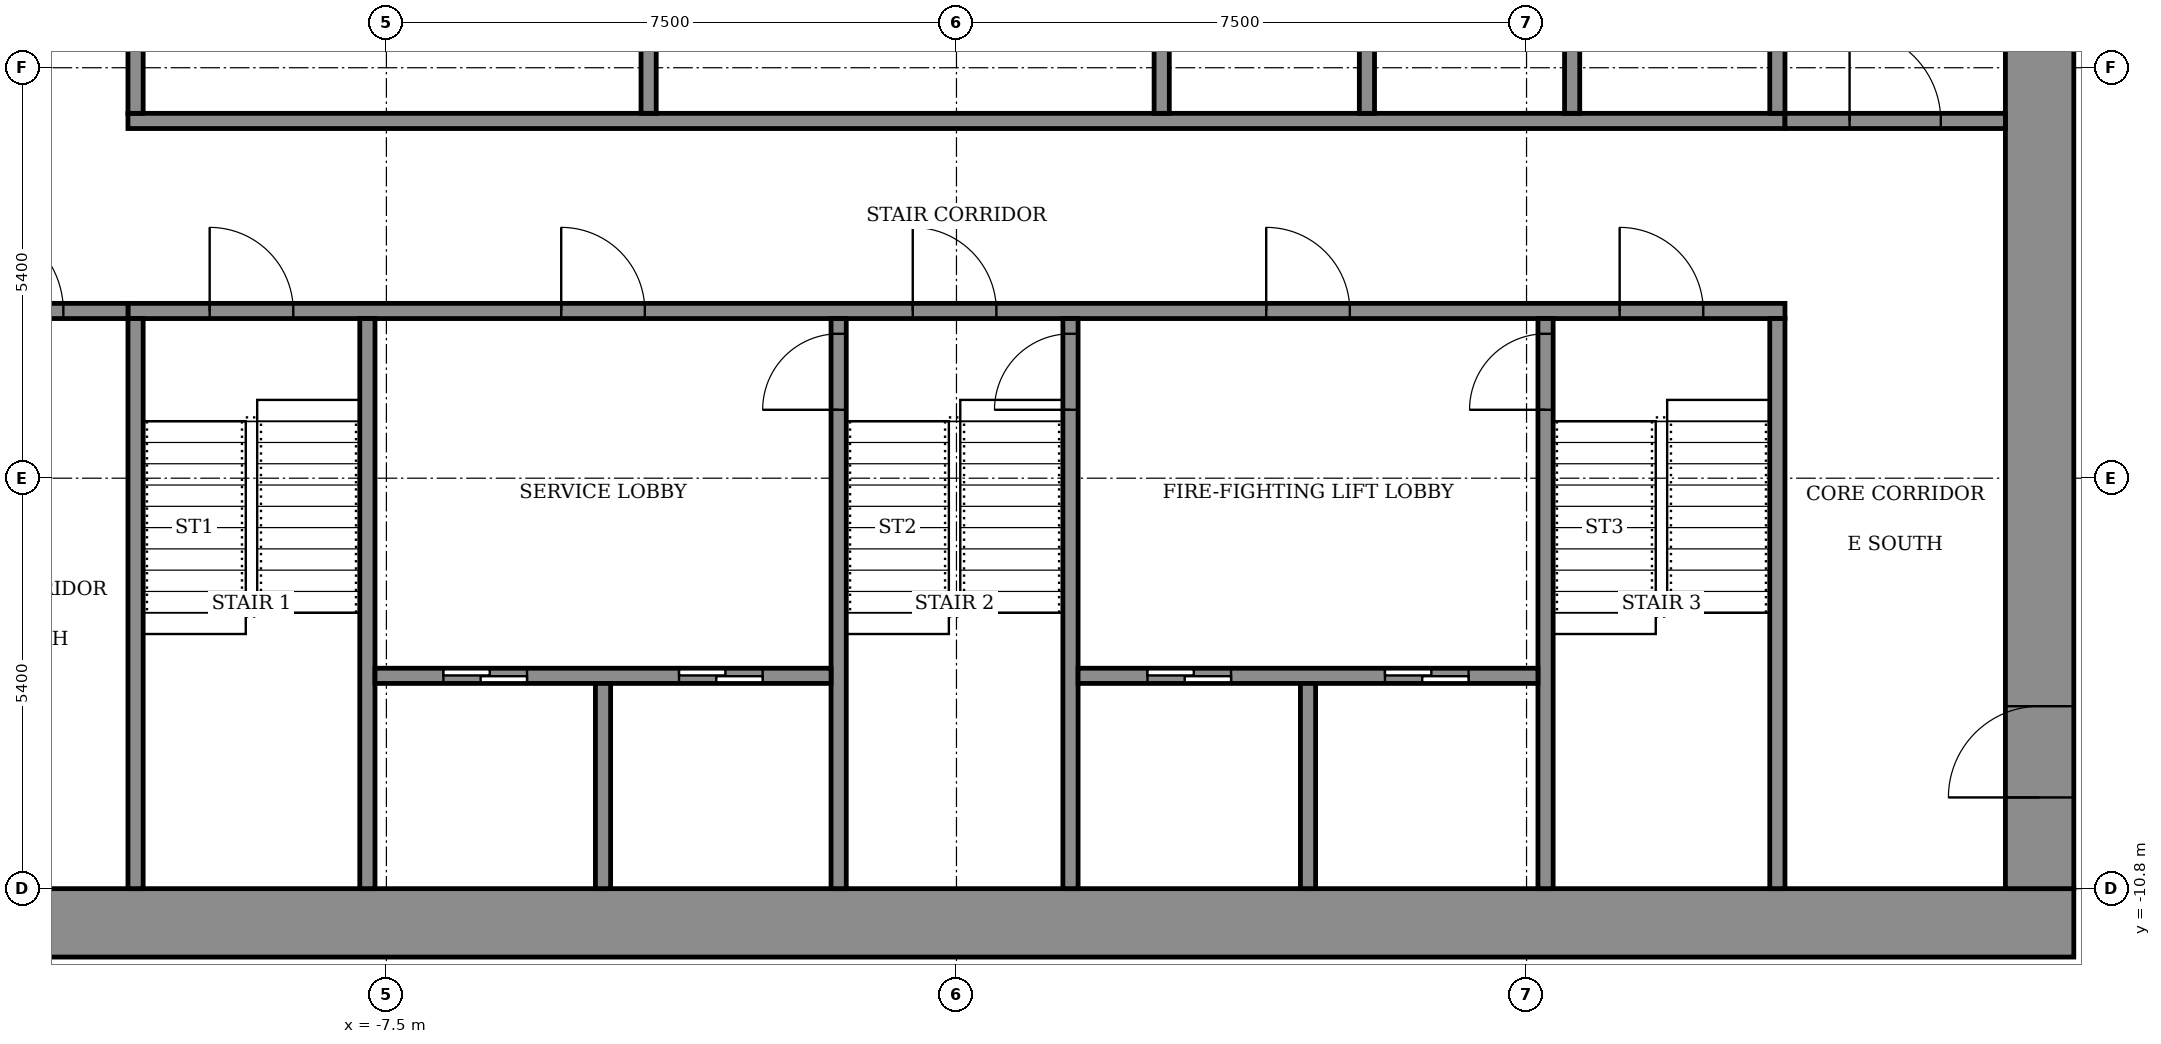
"""IFC4 building model, lengths in metres.
Left out: names, types, materials, properties, quantities, classifications, styles, units other than length and angle.
Written with IfcOpenShell. Run it as: python <this file> out.ifc"""

import sys

from ifc_helpers import new_model, si_unit, direction, frame, frame_2d, origin, place, context, subcontext, project, spatial, rectangle, extrude, element, fill, save


model = new_model("IFC4")
c1 = context("Model", 3, precision=1e-05, world=origin(), true_north=direction((0.0, 1.0)))
c2 = subcontext(c1, "Body", "Model", "MODEL_VIEW")
j1 = project(units=[si_unit("LENGTHUNIT", "METRE"), si_unit("PLANEANGLEUNIT", "RADIAN")], contexts=[c1])
p1 = place(None, origin())
s1 = spatial("IfcSite", under=j1, at=p1, CompositionType="ELEMENT")
p2 = place(p1, origin())
s2 = spatial("IfcBuilding", under=s1, at=p2, CompositionType="ELEMENT")
p3 = place(p2, frame((0.0, 0.0, 152.7)))
s3 = spatial("IfcBuildingStorey", under=s2, at=p3, CompositionType="ELEMENT", Elevation=152.7)
p4 = place(p3, frame((-14.7, -11.25, 0.0), z_axis=(0.0, 0.0, 1.0), x_axis=(1.0, 0.0, 0.0)))
e1 = element("IfcWall", 1, at=p4, inside=s3, PredefinedType="SHEAR", context=c2, shape_type="SweptSolid", body=[
    extrude(rectangle(XDim=29.4, YDim=0.9, at=frame_2d((14.7, 0.0))), origin(), (0.0, 0.0, 1.0), 3.6),
])
p5 = place(p3, frame((14.25, -10.8, 0.0), z_axis=(0.0, 0.0, 1.0), x_axis=(0.0, 1.0, 0.0)))
e2 = element("IfcWall", 2, at=p5, inside=s3, PredefinedType="SHEAR", context=c2, shape_type="SweptSolid", body=[
    extrude(rectangle(XDim=21.6, YDim=0.9, at=frame_2d((10.8, 0.0))), origin(), (0.0, 0.0, 1.0), 3.6),
])
p6 = place(p5, frame((1.2, 0.0, 0.0)))
e3 = element("IfcOpeningElement", 3, at=p6, cuts=e2, PredefinedType="OPENING", context=c2, shape_type="SweptSolid", body=[
    extrude(rectangle(XDim=1.2, YDim=2.1, at=frame_2d((0.6, 1.05))), frame((0.0, 0.46, 0.0), z_axis=(0.0, -1.0, 0.0), x_axis=(1.0, 0.0, 0.0)), (0.0, 0.0, 1.0), 0.92),
])
p7 = place(p3, frame((-10.9, -3.2, 0.0), z_axis=(0.0, 0.0, 1.0), x_axis=(1.0, 0.0, 0.0)))
e4 = element("IfcWall", 4, at=p7, inside=s3, PredefinedType="SHEAR", context=c2, shape_type="SweptSolid", body=[
    extrude(rectangle(XDim=21.8, YDim=0.2, at=frame_2d((10.9, 0.0))), origin(), (0.0, 0.0, 1.0), 3.05),
])
p8 = place(p7, frame((1.075, 0.0, 0.0)))
e5 = element("IfcOpeningElement", 5, at=p8, cuts=e4, PredefinedType="OPENING", context=c2, shape_type="SweptSolid", body=[
    extrude(rectangle(XDim=1.1, YDim=2.1, at=frame_2d((0.55, 1.05))), frame((0.0, 0.11, 0.0), z_axis=(0.0, -1.0, 0.0), x_axis=(1.0, 0.0, 0.0)), (0.0, 0.0, 1.0), 0.22),
])
p9 = place(p7, frame((10.325, 0.0, 0.0)))
e6 = element("IfcOpeningElement", 6, at=p9, cuts=e4, PredefinedType="OPENING", context=c2, shape_type="SweptSolid", body=[
    extrude(rectangle(XDim=1.1, YDim=2.1, at=frame_2d((0.55, 1.05))), frame((0.0, 0.11, 0.0), z_axis=(0.0, -1.0, 0.0), x_axis=(1.0, 0.0, 0.0)), (0.0, 0.0, 1.0), 0.22),
])
p10 = place(p7, frame((19.625, 0.0, 0.0)))
e7 = element("IfcOpeningElement", 7, at=p10, cuts=e4, PredefinedType="OPENING", context=c2, shape_type="SweptSolid", body=[
    extrude(rectangle(XDim=1.1, YDim=2.1, at=frame_2d((0.55, 1.05))), frame((0.0, 0.11, 0.0), z_axis=(0.0, -1.0, 0.0), x_axis=(1.0, 0.0, 0.0)), (0.0, 0.0, 1.0), 0.22),
])
p11 = place(p7, frame((5.7, 0.0, 0.0)))
e8 = element("IfcOpeningElement", 8, at=p11, cuts=e4, PredefinedType="OPENING", context=c2, shape_type="SweptSolid", body=[
    extrude(rectangle(XDim=1.1, YDim=2.1, at=frame_2d((0.55, 1.05))), frame((0.0, 0.11, 0.0), z_axis=(0.0, -1.0, 0.0), x_axis=(1.0, 0.0, 0.0)), (0.0, 0.0, 1.0), 0.22),
])
p12 = place(p7, frame((14.975, 0.0, 0.0)))
e9 = element("IfcOpeningElement", 9, at=p12, cuts=e4, PredefinedType="OPENING", context=c2, shape_type="SweptSolid", body=[
    extrude(rectangle(XDim=1.1, YDim=2.1, at=frame_2d((0.55, 1.05))), frame((0.0, 0.11, 0.0), z_axis=(0.0, -1.0, 0.0), x_axis=(1.0, 0.0, 0.0)), (0.0, 0.0, 1.0), 0.22),
])
p13 = place(p3, frame((-10.9, -0.7, 0.0), z_axis=(0.0, 0.0, 1.0), x_axis=(1.0, 0.0, 0.0)))
e10 = element("IfcWall", 10, at=p13, inside=s3, PredefinedType="SHEAR", context=c2, shape_type="SweptSolid", body=[
    extrude(rectangle(XDim=21.8, YDim=0.2, at=frame_2d((10.9, 0.0))), origin(), (0.0, 0.0, 1.0), 3.05),
])
for number, where, z_axis, x_axis in (
    (11, (-10.8, -10.8, 0.0), (0.0, 0.0, 1.0), (0.0, 1.0, 0.0)),
    (12, (-7.75, -10.8, 0.0), (0.0, 0.0, 1.0), (0.0, 1.0, 0.0)),
):
    element("IfcWall", number, at=place(p3, frame(where, z_axis=z_axis, x_axis=x_axis)), inside=s3, PredefinedType="SHEAR", context=c2, shape_type="SweptSolid", body=[
        extrude(rectangle(XDim=7.5, YDim=0.2, at=frame_2d((3.75, 0.0))), origin(), (0.0, 0.0, 1.0), 3.05),
    ])
p14 = place(p3, frame((-1.55, -10.8, 0.0), z_axis=(0.0, 0.0, 1.0), x_axis=(0.0, 1.0, 0.0)))
e13 = element("IfcWall", 13, at=p14, inside=s3, PredefinedType="SHEAR", context=c2, shape_type="SweptSolid", body=[
    extrude(rectangle(XDim=7.5, YDim=0.2, at=frame_2d((3.75, 0.0))), origin(), (0.0, 0.0, 1.0), 3.05),
])
p15 = place(p14, frame((6.3, 0.0, 0.0)))
e14 = element("IfcOpeningElement", 14, at=p15, cuts=e13, PredefinedType="OPENING", context=c2, shape_type="SweptSolid", body=[
    extrude(rectangle(XDim=1.0, YDim=2.1, at=frame_2d((0.5, 1.05))), frame((0.0, 0.11, 0.0), z_axis=(0.0, -1.0, 0.0), x_axis=(1.0, 0.0, 0.0)), (0.0, 0.0, 1.0), 0.22),
])
p16 = place(p3, frame((1.5, -10.8, 0.0), z_axis=(0.0, 0.0, 1.0), x_axis=(0.0, 1.0, 0.0)))
e15 = element("IfcWall", 15, at=p16, inside=s3, PredefinedType="SHEAR", context=c2, shape_type="SweptSolid", body=[
    extrude(rectangle(XDim=7.5, YDim=0.2, at=frame_2d((3.75, 0.0))), origin(), (0.0, 0.0, 1.0), 3.05),
])
p17 = place(p16, frame((6.3, 0.0, 0.0)))
e16 = element("IfcOpeningElement", 16, at=p17, cuts=e15, PredefinedType="OPENING", context=c2, shape_type="SweptSolid", body=[
    extrude(rectangle(XDim=1.0, YDim=2.1, at=frame_2d((0.5, 1.05))), frame((0.0, 0.11, 0.0), z_axis=(0.0, -1.0, 0.0), x_axis=(1.0, 0.0, 0.0)), (0.0, 0.0, 1.0), 0.22),
])
p18 = place(p3, frame((7.75, -10.8, 0.0), z_axis=(0.0, 0.0, 1.0), x_axis=(0.0, 1.0, 0.0)))
e17 = element("IfcWall", 17, at=p18, inside=s3, PredefinedType="SHEAR", context=c2, shape_type="SweptSolid", body=[
    extrude(rectangle(XDim=7.5, YDim=0.2, at=frame_2d((3.75, 0.0))), origin(), (0.0, 0.0, 1.0), 3.05),
])
p19 = place(p18, frame((6.3, 0.0, 0.0)))
e18 = element("IfcOpeningElement", 18, at=p19, cuts=e17, PredefinedType="OPENING", context=c2, shape_type="SweptSolid", body=[
    extrude(rectangle(XDim=1.0, YDim=2.1, at=frame_2d((0.5, 1.05))), frame((0.0, 0.11, 0.0), z_axis=(0.0, -1.0, 0.0), x_axis=(1.0, 0.0, 0.0)), (0.0, 0.0, 1.0), 0.22),
])
p20 = place(p3, frame((10.8, -10.8, 0.0), z_axis=(0.0, 0.0, 1.0), x_axis=(0.0, 1.0, 0.0)))
e19 = element("IfcWall", 19, at=p20, inside=s3, PredefinedType="SHEAR", context=c2, shape_type="SweptSolid", body=[
    extrude(rectangle(XDim=7.5, YDim=0.2, at=frame_2d((3.75, 0.0))), origin(), (0.0, 0.0, 1.0), 3.05),
])
p21 = place(p3, frame((-7.65, -8.0, 0.0), z_axis=(0.0, 0.0, 1.0), x_axis=(1.0, 0.0, 0.0)))
e20 = element("IfcWall", 20, at=p21, inside=s3, PredefinedType="SHEAR", context=c2, shape_type="SweptSolid", body=[
    extrude(rectangle(XDim=6.0, YDim=0.2, at=frame_2d((3.0, 0.0))), origin(), (0.0, 0.0, 1.0), 3.05),
])
p22 = place(p21, frame((0.9, 0.0, 0.0)))
e21 = element("IfcOpeningElement", 21, at=p22, cuts=e20, PredefinedType="OPENING", context=c2, shape_type="SweptSolid", body=[
    extrude(rectangle(XDim=1.1, YDim=2.1, at=frame_2d((0.55, 1.05))), frame((0.0, 0.11, 0.0), z_axis=(0.0, -1.0, 0.0), x_axis=(1.0, 0.0, 0.0)), (0.0, 0.0, 1.0), 0.22),
])
p23 = place(p21, frame((4.0, 0.0, 0.0)))
e22 = element("IfcOpeningElement", 22, at=p23, cuts=e20, PredefinedType="OPENING", context=c2, shape_type="SweptSolid", body=[
    extrude(rectangle(XDim=1.1, YDim=2.1, at=frame_2d((0.55, 1.05))), frame((0.0, 0.11, 0.0), z_axis=(0.0, -1.0, 0.0), x_axis=(1.0, 0.0, 0.0)), (0.0, 0.0, 1.0), 0.22),
])
p24 = place(p3, frame((-4.65, -10.8, 0.0), z_axis=(0.0, 0.0, 1.0), x_axis=(0.0, 1.0, 0.0)))
e23 = element("IfcWall", 23, at=p24, inside=s3, PredefinedType="SHEAR", context=c2, shape_type="SweptSolid", body=[
    extrude(rectangle(XDim=2.7, YDim=0.2, at=frame_2d((1.35, 0.0))), origin(), (0.0, 0.0, 1.0), 3.05),
])
p25 = place(p3, frame((1.6, -8.0, 0.0), z_axis=(0.0, 0.0, 1.0), x_axis=(1.0, 0.0, 0.0)))
e24 = element("IfcWall", 24, at=p25, inside=s3, PredefinedType="SHEAR", context=c2, shape_type="SweptSolid", body=[
    extrude(rectangle(XDim=6.05, YDim=0.2, at=frame_2d((3.025, 0.0))), origin(), (0.0, 0.0, 1.0), 3.05),
])
p26 = place(p25, frame((0.913, 0.0, 0.0)))
e25 = element("IfcOpeningElement", 25, at=p26, cuts=e24, PredefinedType="OPENING", context=c2, shape_type="SweptSolid", body=[
    extrude(rectangle(XDim=1.1, YDim=2.1, at=frame_2d((0.55, 1.05))), frame((0.0, 0.11, 0.0), z_axis=(0.0, -1.0, 0.0), x_axis=(1.0, 0.0, 0.0)), (0.0, 0.0, 1.0), 0.22),
])
p27 = place(p25, frame((4.038, 0.0, 0.0)))
e26 = element("IfcOpeningElement", 26, at=p27, cuts=e24, PredefinedType="OPENING", context=c2, shape_type="SweptSolid", body=[
    extrude(rectangle(XDim=1.1, YDim=2.1, at=frame_2d((0.55, 1.05))), frame((0.0, 0.11, 0.0), z_axis=(0.0, -1.0, 0.0), x_axis=(1.0, 0.0, 0.0)), (0.0, 0.0, 1.0), 0.22),
])
p28 = place(p3, frame((4.625, -10.8, 0.0), z_axis=(0.0, 0.0, 1.0), x_axis=(0.0, 1.0, 0.0)))
e27 = element("IfcWall", 27, at=p28, inside=s3, PredefinedType="SHEAR", context=c2, shape_type="SweptSolid", body=[
    extrude(rectangle(XDim=2.7, YDim=0.2, at=frame_2d((1.35, 0.0))), origin(), (0.0, 0.0, 1.0), 3.05),
])
for number, where, z_axis, x_axis in (
    (28, (-10.8, -0.6, 0.0), (0.0, 0.0, 1.0), (0.0, 1.0, 0.0)),
    (29, (-4.05, -0.6, 0.0), (0.0, 0.0, 1.0), (0.0, 1.0, 0.0)),
):
    element("IfcWall", number, at=place(p3, frame(where, z_axis=z_axis, x_axis=x_axis)), inside=s3, PredefinedType="STANDARD", context=c2, shape_type="SweptSolid", body=[
        extrude(rectangle(XDim=2.5, YDim=0.2, at=frame_2d((1.25, 0.0))), origin(), (0.0, 0.0, 1.0), 3.05),
    ])
for number, where, z_axis, x_axis in (
    (30, (2.7, -0.6, 0.0), (0.0, 0.0, 1.0), (0.0, 1.0, 0.0)),
    (31, (5.4, -0.6, 0.0), (0.0, 0.0, 1.0), (0.0, 1.0, 0.0)),
    (32, (8.1, -0.6, 0.0), (0.0, 0.0, 1.0), (0.0, 1.0, 0.0)),
    (33, (10.8, -0.6, 0.0), (0.0, 0.0, 1.0), (0.0, 1.0, 0.0)),
):
    element("IfcWall", number, at=place(p3, frame(where, z_axis=z_axis, x_axis=x_axis)), inside=s3, PredefinedType="SHEAR", context=c2, shape_type="SweptSolid", body=[
        extrude(rectangle(XDim=2.5, YDim=0.2, at=frame_2d((1.25, 0.0))), origin(), (0.0, 0.0, 1.0), 3.05),
    ])
p29 = place(p3, frame((-13.8, -3.2, 0.0), z_axis=(0.0, 0.0, 1.0), x_axis=(1.0, 0.0, 0.0)))
e34 = element("IfcWall", 34, at=p29, inside=s3, PredefinedType="STANDARD", context=c2, shape_type="SweptSolid", body=[
    extrude(rectangle(XDim=2.9, YDim=0.2, at=frame_2d((1.45, 0.0))), origin(), (0.0, 0.0, 1.0), 3.05),
])
p30 = place(p29, frame((0.85, 0.0, 0.0)))
e35 = element("IfcOpeningElement", 35, at=p30, cuts=e34, PredefinedType="OPENING", context=c2, shape_type="SweptSolid", body=[
    extrude(rectangle(XDim=1.2, YDim=2.1, at=frame_2d((0.6, 1.05))), frame((0.0, 0.11, 0.0), z_axis=(0.0, -1.0, 0.0), x_axis=(1.0, 0.0, 0.0)), (0.0, 0.0, 1.0), 0.22),
])
p31 = place(p3, frame((10.9, -0.7, 0.0), z_axis=(0.0, 0.0, 1.0), x_axis=(1.0, 0.0, 0.0)))
e36 = element("IfcWall", 36, at=p31, inside=s3, PredefinedType="STANDARD", context=c2, shape_type="SweptSolid", body=[
    extrude(rectangle(XDim=2.9, YDim=0.2, at=frame_2d((1.45, 0.0))), origin(), (0.0, 0.0, 1.0), 3.05),
])
p32 = place(p31, frame((0.85, 0.0, 0.0)))
e37 = element("IfcOpeningElement", 37, at=p32, cuts=e36, PredefinedType="OPENING", context=c2, shape_type="SweptSolid", body=[
    extrude(rectangle(XDim=1.2, YDim=2.1, at=frame_2d((0.6, 1.05))), frame((0.0, 0.11, 0.0), z_axis=(0.0, -1.0, 0.0), x_axis=(1.0, 0.0, 0.0)), (0.0, 0.0, 1.0), 0.22),
])
p33 = place(p6, origin())
e38 = element("IfcDoor", 38, at=p33, inside=s3, OperationType="DOUBLE_DOOR_SINGLE_SWING", PredefinedType="DOOR", context=c2, shape_type="SweptSolid", body=[
    extrude(rectangle(XDim=1.2, YDim=2.1, at=frame_2d((0.6, 1.05))), frame((0.0, 0.025, 0.0), z_axis=(0.0, -1.0, 0.0), x_axis=(1.0, 0.0, 0.0)), (0.0, 0.0, 1.0), 0.05),
])
fill(e3, e38)
p34 = place(p26, origin())
e39 = element("IfcDoor", 39, at=p34, inside=s3, OperationType="SLIDING_TO_LEFT", PredefinedType="DOOR", context=c2, shape_type="SweptSolid", body=[
    extrude(rectangle(XDim=1.1, YDim=2.1, at=frame_2d((0.55, 1.05))), frame((0.0, 0.025, 0.0), z_axis=(0.0, -1.0, 0.0), x_axis=(1.0, 0.0, 0.0)), (0.0, 0.0, 1.0), 0.05),
])
fill(e25, e39)
p35 = place(p22, origin())
e40 = element("IfcDoor", 40, at=p35, inside=s3, OperationType="SLIDING_TO_LEFT", PredefinedType="DOOR", context=c2, shape_type="SweptSolid", body=[
    extrude(rectangle(XDim=1.1, YDim=2.1, at=frame_2d((0.55, 1.05))), frame((0.0, 0.025, 0.0), z_axis=(0.0, -1.0, 0.0), x_axis=(1.0, 0.0, 0.0)), (0.0, 0.0, 1.0), 0.05),
])
fill(e21, e40)
p36 = place(p27, origin())
e41 = element("IfcDoor", 41, at=p36, inside=s3, OperationType="SLIDING_TO_LEFT", PredefinedType="DOOR", context=c2, shape_type="SweptSolid", body=[
    extrude(rectangle(XDim=1.1, YDim=2.1, at=frame_2d((0.55, 1.05))), frame((0.0, 0.025, 0.0), z_axis=(0.0, -1.0, 0.0), x_axis=(1.0, 0.0, 0.0)), (0.0, 0.0, 1.0), 0.05),
])
fill(e26, e41)
p37 = place(p23, origin())
e42 = element("IfcDoor", 42, at=p37, inside=s3, OperationType="SLIDING_TO_LEFT", PredefinedType="DOOR", context=c2, shape_type="SweptSolid", body=[
    extrude(rectangle(XDim=1.1, YDim=2.1, at=frame_2d((0.55, 1.05))), frame((0.0, 0.025, 0.0), z_axis=(0.0, -1.0, 0.0), x_axis=(1.0, 0.0, 0.0)), (0.0, 0.0, 1.0), 0.05),
])
fill(e22, e42)
p38 = place(p8, origin())
e43 = element("IfcDoor", 43, at=p38, inside=s3, OperationType="SINGLE_SWING_RIGHT", PredefinedType="DOOR", context=c2, shape_type="SweptSolid", body=[
    extrude(rectangle(XDim=1.1, YDim=2.1, at=frame_2d((0.55, 1.05))), frame((0.0, 0.025, 0.0), z_axis=(0.0, -1.0, 0.0), x_axis=(1.0, 0.0, 0.0)), (0.0, 0.0, 1.0), 0.05),
])
fill(e5, e43)
p39 = place(p9, origin())
e44 = element("IfcDoor", 44, at=p39, inside=s3, OperationType="SINGLE_SWING_RIGHT", PredefinedType="DOOR", context=c2, shape_type="SweptSolid", body=[
    extrude(rectangle(XDim=1.1, YDim=2.1, at=frame_2d((0.55, 1.05))), frame((0.0, 0.025, 0.0), z_axis=(0.0, -1.0, 0.0), x_axis=(1.0, 0.0, 0.0)), (0.0, 0.0, 1.0), 0.05),
])
fill(e6, e44)
p40 = place(p10, origin())
e45 = element("IfcDoor", 45, at=p40, inside=s3, OperationType="SINGLE_SWING_RIGHT", PredefinedType="DOOR", context=c2, shape_type="SweptSolid", body=[
    extrude(rectangle(XDim=1.1, YDim=2.1, at=frame_2d((0.55, 1.05))), frame((0.0, 0.025, 0.0), z_axis=(0.0, -1.0, 0.0), x_axis=(1.0, 0.0, 0.0)), (0.0, 0.0, 1.0), 0.05),
])
fill(e7, e45)
p41 = place(p11, origin())
e46 = element("IfcDoor", 46, at=p41, inside=s3, OperationType="SINGLE_SWING_LEFT", PredefinedType="DOOR", context=c2, shape_type="SweptSolid", body=[
    extrude(rectangle(XDim=1.1, YDim=2.1, at=frame_2d((0.55, 1.05))), frame((0.0, 0.025, 0.0), z_axis=(0.0, -1.0, 0.0), x_axis=(1.0, 0.0, 0.0)), (0.0, 0.0, 1.0), 0.05),
])
fill(e8, e46)
p42 = place(p12, origin())
e47 = element("IfcDoor", 47, at=p42, inside=s3, OperationType="SINGLE_SWING_LEFT", PredefinedType="DOOR", context=c2, shape_type="SweptSolid", body=[
    extrude(rectangle(XDim=1.1, YDim=2.1, at=frame_2d((0.55, 1.05))), frame((0.0, 0.025, 0.0), z_axis=(0.0, -1.0, 0.0), x_axis=(1.0, 0.0, 0.0)), (0.0, 0.0, 1.0), 0.05),
])
fill(e9, e47)
p43 = place(p15, origin())
e48 = element("IfcDoor", 48, at=p43, inside=s3, OperationType="SINGLE_SWING_RIGHT", PredefinedType="DOOR", context=c2, shape_type="SweptSolid", body=[
    extrude(rectangle(XDim=1.0, YDim=2.1, at=frame_2d((0.5, 1.05))), frame((0.0, 0.025, 0.0), z_axis=(0.0, -1.0, 0.0), x_axis=(1.0, 0.0, 0.0)), (0.0, 0.0, 1.0), 0.05),
])
fill(e14, e48)
p44 = place(p17, origin())
e49 = element("IfcDoor", 49, at=p44, inside=s3, OperationType="SINGLE_SWING_RIGHT", PredefinedType="DOOR", context=c2, shape_type="SweptSolid", body=[
    extrude(rectangle(XDim=1.0, YDim=2.1, at=frame_2d((0.5, 1.05))), frame((0.0, 0.025, 0.0), z_axis=(0.0, -1.0, 0.0), x_axis=(1.0, 0.0, 0.0)), (0.0, 0.0, 1.0), 0.05),
])
fill(e16, e49)
p45 = place(p19, origin())
e50 = element("IfcDoor", 50, at=p45, inside=s3, OperationType="SINGLE_SWING_RIGHT", PredefinedType="DOOR", context=c2, shape_type="SweptSolid", body=[
    extrude(rectangle(XDim=1.0, YDim=2.1, at=frame_2d((0.5, 1.05))), frame((0.0, 0.025, 0.0), z_axis=(0.0, -1.0, 0.0), x_axis=(1.0, 0.0, 0.0)), (0.0, 0.0, 1.0), 0.05),
])
fill(e18, e50)
p46 = place(p30, origin())
e51 = element("IfcDoor", 51, at=p46, inside=s3, OperationType="SINGLE_SWING_LEFT", PredefinedType="DOOR", context=c2, shape_type="SweptSolid", body=[
    extrude(rectangle(XDim=1.2, YDim=2.1, at=frame_2d((0.6, 1.05))), frame((0.0, 0.025, 0.0), z_axis=(0.0, -1.0, 0.0), x_axis=(1.0, 0.0, 0.0)), (0.0, 0.0, 1.0), 0.05),
])
fill(e35, e51)
p47 = place(p32, origin())
e52 = element("IfcDoor", 52, at=p47, inside=s3, OperationType="SINGLE_SWING_LEFT", PredefinedType="DOOR", context=c2, shape_type="SweptSolid", body=[
    extrude(rectangle(XDim=1.2, YDim=2.1, at=frame_2d((0.6, 1.05))), frame((0.0, 0.025, 0.0), z_axis=(0.0, -1.0, 0.0), x_axis=(1.0, 0.0, 0.0)), (0.0, 0.0, 1.0), 0.05),
])
fill(e37, e52)
save(model, sys.argv[1])
